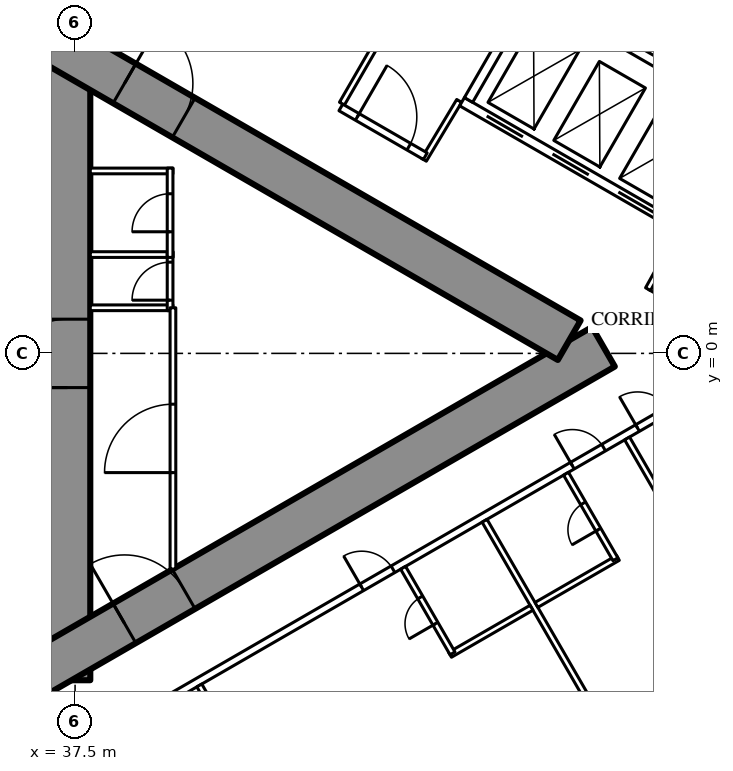
"""IFC4 building model, lengths in metres.
Left out: names, types, materials, properties, quantities, classifications, styles, units other than length and angle.
Written with IfcOpenShell. Run it as: python <this file> out.ifc"""

import sys

from ifc_helpers import new_model, si_unit, direction, frame, frame_2d, origin, place, context, subcontext, project, spatial, rectangle, extrude, element, fill, save


model = new_model("IFC4")
c1 = context("Model", 3, precision=1e-05, world=origin(), true_north=direction((0.0, 1.0)))
c2 = subcontext(c1, "Body", "Model", "MODEL_VIEW")
j1 = project(units=[si_unit("LENGTHUNIT", "METRE"), si_unit("PLANEANGLEUNIT", "RADIAN")], contexts=[c1])
p1 = place(None, origin())
s1 = spatial("IfcSite", under=j1, at=p1, CompositionType="ELEMENT")
p2 = place(p1, origin())
s2 = spatial("IfcBuilding", under=s1, at=p2, CompositionType="ELEMENT")
p3 = place(p2, frame((0.0, 0.0, 173.8)))
s3 = spatial("IfcBuildingStorey", under=s2, at=p3, CompositionType="ELEMENT", Elevation=173.8)
p4 = place(p3, frame((37.3, -8.6, 0.0), z_axis=(0.0, 0.0, 1.0), x_axis=(0.0, 1.0, 0.0)))
e1 = element("IfcWall", 1, at=p4, inside=s3, PredefinedType="SHEAR", context=c2, shape_type="SweptSolid", body=[
    extrude(rectangle(XDim=17.2, YDim=1.2, at=frame_2d((8.6, 0.0))), origin(), (0.0, 0.0, 1.0), 3.5),
])
p5 = place(p4, frame((7.7, 0.0, 0.0)))
e2 = element("IfcOpeningElement", 2, at=p5, cuts=e1, PredefinedType="OPENING", context=c2, shape_type="SweptSolid", body=[
    extrude(rectangle(XDim=1.8, YDim=2.2, at=frame_2d((0.9, 1.1))), frame((0.0, 0.61, 0.0), z_axis=(0.0, -1.0, 0.0), x_axis=(1.0, 0.0, 0.0)), (0.0, 0.0, 1.0), 1.22),
])
p6 = place(p3, frame((27.2, -13.8, 0.0), z_axis=(0.0, 0.0, 1.0), x_axis=(0.866027159892, 0.499996958321, 0.0)))
e3 = element("IfcWall", 3, at=p6, inside=s3, PredefinedType="SHEAR", context=c2, shape_type="SweptSolid", body=[
    extrude(rectangle(XDim=27.947, YDim=1.2, at=frame_2d((13.973, 0.0))), origin(), (0.0, 0.0, 1.0), 3.5),
])
p7 = place(p6, frame((4.6, 0.0, 0.0)))
e4 = element("IfcOpeningElement", 4, at=p7, cuts=e3, PredefinedType="OPENING", context=c2, shape_type="SweptSolid", body=[
    extrude(rectangle(XDim=1.0, YDim=2.2, at=frame_2d((0.5, 1.1))), frame((0.0, 0.61, 0.0), z_axis=(0.0, -1.0, 0.0), x_axis=(1.0, 0.0, 0.0)), (0.0, 0.0, 1.0), 1.22),
])
p8 = place(p6, frame((13.395, 0.0, 0.0)))
e5 = element("IfcOpeningElement", 5, at=p8, cuts=e3, PredefinedType="OPENING", context=c2, shape_type="SweptSolid", body=[
    extrude(rectangle(XDim=1.8, YDim=2.2, at=frame_2d((0.9, 1.1))), frame((0.0, 0.61, 0.0), z_axis=(0.0, -1.0, 0.0), x_axis=(1.0, 0.0, 0.0)), (0.0, 0.0, 1.0), 1.22),
])
p9 = place(p3, frame((27.2, 13.8, 0.0), z_axis=(0.0, 0.0, 1.0), x_axis=(0.866024515034, -0.500001539357, 0.0)))
e6 = element("IfcWall", 6, at=p9, inside=s3, PredefinedType="SHEAR", context=c2, shape_type="SweptSolid", body=[
    extrude(rectangle(XDim=26.907, YDim=1.2, at=frame_2d((13.454, 0.0))), origin(), (0.0, 0.0, 1.0), 3.5),
])
p10 = place(p9, frame((4.6, 0.0, 0.0)))
e7 = element("IfcOpeningElement", 7, at=p10, cuts=e6, PredefinedType="OPENING", context=c2, shape_type="SweptSolid", body=[
    extrude(rectangle(XDim=1.0, YDim=2.2, at=frame_2d((0.5, 1.1))), frame((0.0, 0.61, 0.0), z_axis=(0.0, -1.0, 0.0), x_axis=(1.0, 0.0, 0.0)), (0.0, 0.0, 1.0), 1.22),
])
p11 = place(p9, frame((13.395, 0.0, 0.0)))
e8 = element("IfcOpeningElement", 8, at=p11, cuts=e6, PredefinedType="OPENING", context=c2, shape_type="SweptSolid", body=[
    extrude(rectangle(XDim=1.8, YDim=2.2, at=frame_2d((0.9, 1.1))), frame((0.0, 0.61, 0.0), z_axis=(0.0, -1.0, 0.0), x_axis=(1.0, 0.0, 0.0)), (0.0, 0.0, 1.0), 1.22),
])
p12 = place(p3, frame((27.959, -16.017, 0.0), z_axis=(0.0, 0.0, 1.0), x_axis=(0.866024151371, 0.500002169237, 0.0)))
e9 = element("IfcWall", 9, at=p12, inside=s3, PredefinedType="PARTITIONING", context=c2, shape_type="SweptSolid", body=[
    extrude(rectangle(XDim=32.034, YDim=0.2, at=frame_2d((16.017, 0.0))), origin(), (0.0, 0.0, 1.0), 3.25),
])
p13 = place(p12, frame((4.765, 0.0, 0.0)))
e10 = element("IfcOpeningElement", 10, at=p13, cuts=e9, PredefinedType="OPENING", context=c2, shape_type="SweptSolid", body=[
    extrude(rectangle(XDim=0.95, YDim=2.2, at=frame_2d((0.475, 1.1))), frame((0.0, 0.11, 0.0), z_axis=(0.0, -1.0, 0.0), x_axis=(1.0, 0.0, 0.0)), (0.0, 0.0, 1.0), 0.22),
])
p14 = place(p12, frame((9.215, 0.0, 0.0)))
e11 = element("IfcOpeningElement", 11, at=p14, cuts=e9, PredefinedType="OPENING", context=c2, shape_type="SweptSolid", body=[
    extrude(rectangle(XDim=1.0, YDim=2.2, at=frame_2d((0.5, 1.1))), frame((0.0, 0.11, 0.0), z_axis=(0.0, -1.0, 0.0), x_axis=(1.0, 0.0, 0.0)), (0.0, 0.0, 1.0), 0.22),
])
p15 = place(p12, frame((19.725, 0.0, 0.0)))
e12 = element("IfcOpeningElement", 12, at=p15, cuts=e9, PredefinedType="OPENING", context=c2, shape_type="SweptSolid", body=[
    extrude(rectangle(XDim=0.95, YDim=2.2, at=frame_2d((0.475, 1.1))), frame((0.0, 0.11, 0.0), z_axis=(0.0, -1.0, 0.0), x_axis=(1.0, 0.0, 0.0)), (0.0, 0.0, 1.0), 0.22),
])
p16 = place(p12, frame((26.125, 0.0, 0.0)))
e13 = element("IfcOpeningElement", 13, at=p16, cuts=e9, PredefinedType="OPENING", context=c2, shape_type="SweptSolid", body=[
    extrude(rectangle(XDim=0.95, YDim=2.2, at=frame_2d((0.475, 1.1))), frame((0.0, 0.11, 0.0), z_axis=(0.0, -1.0, 0.0), x_axis=(1.0, 0.0, 0.0)), (0.0, 0.0, 1.0), 0.22),
])
p17 = place(p12, frame((28.106, 0.0, 0.0)))
e14 = element("IfcOpeningElement", 14, at=p17, cuts=e9, PredefinedType="OPENING", context=c2, shape_type="SweptSolid", body=[
    extrude(rectangle(XDim=0.95, YDim=2.2, at=frame_2d((0.475, 1.1))), frame((0.0, 0.11, 0.0), z_axis=(0.0, -1.0, 0.0), x_axis=(1.0, 0.0, 0.0)), (0.0, 0.0, 1.0), 0.22),
])
p18 = place(p3, frame((40.769, -8.737, 0.0), z_axis=(0.0, 0.0, 1.0), x_axis=(0.500013115284, -0.866017831539, 0.0)))
e15 = element("IfcWall", 15, at=p18, inside=s3, PredefinedType="PARTITIONING", context=c2, shape_type="SweptSolid", body=[
    extrude(rectangle(XDim=7.198, YDim=0.15, at=frame_2d((3.599, 0.0))), origin(), (0.0, 0.0, 1.0), 2.3),
])
p19 = place(p3, frame((48.275, -4.404, 0.0), z_axis=(0.0, 0.0, 1.0), x_axis=(0.500006004368, -0.866021937133, 0.0)))
e16 = element("IfcWall", 16, at=p19, inside=s3, PredefinedType="PARTITIONING", context=c2, shape_type="SweptSolid", body=[
    extrude(rectangle(XDim=7.279, YDim=0.15, at=frame_2d((3.64, 0.0))), origin(), (0.0, 0.0, 1.0), 2.3),
])
p20 = place(p3, frame((52.025, -2.238, 0.0), z_axis=(0.0, 0.0, 1.0), x_axis=(0.499983785035, -0.866034765296, 0.0)))
e17 = element("IfcWall", 17, at=p20, inside=s3, PredefinedType="PARTITIONING", context=c2, shape_type="SweptSolid", body=[
    extrude(rectangle(XDim=7.116, YDim=0.15, at=frame_2d((3.558, 0.0))), origin(), (0.0, 0.0, 1.0), 2.3),
])
p21 = place(p3, frame((44.521, 6.571, 0.0), z_axis=(0.0, 0.0, 1.0), x_axis=(0.500020376429, 0.866013639128, 0.0)))
e18 = element("IfcWall", 18, at=p21, inside=s3, PredefinedType="PARTITIONING", context=c2, shape_type="SweptSolid", body=[
    extrude(rectangle(XDim=7.306, YDim=0.15, at=frame_2d((3.653, 0.0))), origin(), (0.0, 0.0, 1.0), 2.3),
])
p22 = place(p3, frame((52.639, 1.769, 0.0), z_axis=(0.0, 0.0, 1.0), x_axis=(0.866027340901, -0.4999966448, 0.0)))
e19 = element("IfcWall", 19, at=p22, inside=s3, PredefinedType="PARTITIONING", context=c2, shape_type="SweptSolid", body=[
    extrude(rectangle(XDim=3.417, YDim=0.2, at=frame_2d((1.708, 0.0))), origin(), (0.0, 0.0, 1.0), 3.25),
])
p23 = place(p22, frame((0.809, 0.0, 0.0)))
e20 = element("IfcOpeningElement", 20, at=p23, cuts=e19, PredefinedType="OPENING", context=c2, shape_type="SweptSolid", body=[
    extrude(rectangle(XDim=1.8, YDim=2.2, at=frame_2d((0.9, 1.1))), frame((0.0, 0.11, 0.0), z_axis=(0.0, -1.0, 0.0), x_axis=(1.0, 0.0, 0.0)), (0.0, 0.0, 1.0), 0.22),
])
p24 = place(p3, frame((52.576, 1.689, 0.0), z_axis=(0.0, 0.0, 1.0), x_axis=(0.485424724123, 0.874278466629, 0.0)))
e21 = element("IfcWall", 21, at=p24, inside=s3, PredefinedType="PARTITIONING", context=c2, shape_type="SweptSolid", body=[
    extrude(rectangle(XDim=1.805, YDim=0.15, at=frame_2d((0.903, 0.0))), origin(), (0.0, 0.0, 1.0), 3.25),
])
p25 = place(p3, frame((47.606, 6.643, 0.0), z_axis=(0.0, 0.0, 1.0), x_axis=(-0.514237157483, -0.857648031458, 0.0)))
e22 = element("IfcWall", 22, at=p25, inside=s3, PredefinedType="PARTITIONING", context=c2, shape_type="SweptSolid", body=[
    extrude(rectangle(XDim=1.805, YDim=0.15, at=frame_2d((0.902, 0.0))), origin(), (0.0, 0.0, 1.0), 3.25),
])
p26 = place(p3, frame((44.493, 6.472, 0.0), z_axis=(0.0, 0.0, 1.0), x_axis=(0.866027140358, -0.499996992154, 0.0)))
e23 = element("IfcWall", 23, at=p26, inside=s3, PredefinedType="PARTITIONING", context=c2, shape_type="SweptSolid", body=[
    extrude(rectangle(XDim=2.566, YDim=0.2, at=frame_2d((1.283, 0.0))), origin(), (0.0, 0.0, 1.0), 3.25),
])
p27 = place(p26, frame((0.5, 0.0, 0.0)))
e24 = element("IfcOpeningElement", 24, at=p27, cuts=e23, PredefinedType="OPENING", context=c2, shape_type="SweptSolid", body=[
    extrude(rectangle(XDim=1.566, YDim=2.2, at=frame_2d((0.783, 1.1))), frame((0.0, 0.11, 0.0), z_axis=(0.0, -1.0, 0.0), x_axis=(1.0, 0.0, 0.0)), (0.0, 0.0, 1.0), 0.22),
])
p28 = place(p3, frame((47.366, -7.93, 0.0), z_axis=(0.0, 0.0, 1.0), x_axis=(0.866031185235, 0.4999899861, 0.0)))
e25 = element("IfcWall", 25, at=p28, inside=s3, PredefinedType="PARTITIONING", context=c2, shape_type="SweptSolid", body=[
    extrude(rectangle(XDim=2.475, YDim=0.15, at=frame_2d((1.238, 0.0))), origin(), (0.0, 0.0, 1.0), 3.25),
])
p29 = place(p3, frame((46.131, -5.641, 0.0), z_axis=(0.0, 0.0, 1.0), x_axis=(0.49997716683, -0.86603858612, 0.0)))
e26 = element("IfcWall", 26, at=p29, inside=s3, PredefinedType="PARTITIONING", context=c2, shape_type="SweptSolid", body=[
    extrude(rectangle(XDim=2.6, YDim=0.15, at=frame_2d((1.3, 0.0))), origin(), (0.0, 0.0, 1.0), 3.25),
])
p30 = place(p29, frame((0.9, 0.0, 0.0)))
e27 = element("IfcOpeningElement", 27, at=p30, cuts=e26, PredefinedType="OPENING", context=c2, shape_type="SweptSolid", body=[
    extrude(rectangle(XDim=0.8, YDim=2.2, at=frame_2d((0.4, 1.1))), frame((0.0, 0.085, 0.0), z_axis=(0.0, -1.0, 0.0), x_axis=(1.0, 0.0, 0.0)), (0.0, 0.0, 1.0), 0.17),
])
p31 = place(p3, frame((49.64, -6.618, 0.0), z_axis=(0.0, 0.0, 1.0), x_axis=(0.866006523861, 0.500032699561, 0.0)))
e28 = element("IfcWall", 28, at=p31, inside=s3, PredefinedType="PARTITIONING", context=c2, shape_type="SweptSolid", body=[
    extrude(rectangle(XDim=2.475, YDim=0.15, at=frame_2d((1.237, 0.0))), origin(), (0.0, 0.0, 1.0), 3.25),
])
p32 = place(p3, frame((50.418, -3.166, 0.0), z_axis=(0.0, 0.0, 1.0), x_axis=(0.499936506574, -0.866062058628, 0.0)))
e29 = element("IfcWall", 29, at=p32, inside=s3, PredefinedType="PARTITIONING", context=c2, shape_type="SweptSolid", body=[
    extrude(rectangle(XDim=2.6, YDim=0.15, at=frame_2d((1.3, 0.0))), origin(), (0.0, 0.0, 1.0), 3.25),
])
p33 = place(p32, frame((0.9, 0.0, 0.0)))
e30 = element("IfcOpeningElement", 30, at=p33, cuts=e29, PredefinedType="OPENING", context=c2, shape_type="SweptSolid", body=[
    extrude(rectangle(XDim=0.8, YDim=2.2, at=frame_2d((0.4, 1.1))), frame((0.0, 0.085, 0.0), z_axis=(0.0, -1.0, 0.0), x_axis=(1.0, 0.0, 0.0)), (0.0, 0.0, 1.0), 0.17),
])
for number, where, z_axis, x_axis in (
    (31, (37.9, 1.2, 0.0), (0.0, 0.0, 1.0), (1.0, 0.0, 0.0)),
    (32, (37.9, 2.6, 0.0), (0.0, 0.0, 1.0), (1.0, 0.0, 0.0)),
    (33, (37.9, 4.8, 0.0), (0.0, 0.0, 1.0), (1.0, 0.0, 0.0)),
):
    element("IfcWall", number, at=place(p3, frame(where, z_axis=z_axis, x_axis=x_axis)), inside=s3, PredefinedType="PARTITIONING", context=c2, shape_type="SweptSolid", body=[
        extrude(rectangle(XDim=2.175, YDim=0.15, at=frame_2d((1.087, 0.0))), origin(), (0.0, 0.0, 1.0), 3.25),
    ])
p34 = place(p3, frame((40.0, 1.125, 0.0), z_axis=(0.0, 0.0, 1.0), x_axis=(0.0, 1.0, 0.0)))
e34 = element("IfcWall", 34, at=p34, inside=s3, PredefinedType="PARTITIONING", context=c2, shape_type="SweptSolid", body=[
    extrude(rectangle(XDim=1.55, YDim=0.15, at=frame_2d((0.775, 0.0))), origin(), (0.0, 0.0, 1.0), 3.25),
])
p35 = place(p34, frame((0.275, 0.0, 0.0)))
e35 = element("IfcOpeningElement", 35, at=p35, cuts=e34, PredefinedType="OPENING", context=c2, shape_type="SweptSolid", body=[
    extrude(rectangle(XDim=1.0, YDim=2.2, at=frame_2d((0.5, 1.1))), frame((0.0, 0.085, 0.0), z_axis=(0.0, -1.0, 0.0), x_axis=(1.0, 0.0, 0.0)), (0.0, 0.0, 1.0), 0.17),
])
p36 = place(p3, frame((40.0, 2.525, 0.0), z_axis=(0.0, 0.0, 1.0), x_axis=(0.0, 1.0, 0.0)))
e36 = element("IfcWall", 36, at=p36, inside=s3, PredefinedType="PARTITIONING", context=c2, shape_type="SweptSolid", body=[
    extrude(rectangle(XDim=2.35, YDim=0.15, at=frame_2d((1.175, 0.0))), origin(), (0.0, 0.0, 1.0), 3.25),
])
p37 = place(p36, frame((0.675, 0.0, 0.0)))
e37 = element("IfcOpeningElement", 37, at=p37, cuts=e36, PredefinedType="OPENING", context=c2, shape_type="SweptSolid", body=[
    extrude(rectangle(XDim=1.0, YDim=2.2, at=frame_2d((0.5, 1.1))), frame((0.0, 0.085, 0.0), z_axis=(0.0, -1.0, 0.0), x_axis=(1.0, 0.0, 0.0)), (0.0, 0.0, 1.0), 0.17),
])
p38 = place(p3, frame((40.075, -5.674, 0.0), z_axis=(0.0, 0.0, 1.0), x_axis=(0.0, 1.0, 0.0)))
e38 = element("IfcWall", 38, at=p38, inside=s3, PredefinedType="PARTITIONING", context=c2, shape_type="SweptSolid", body=[
    extrude(rectangle(XDim=6.874, YDim=0.15, at=frame_2d((3.437, 0.0))), origin(), (0.0, 0.0, 1.0), 3.25),
])
p39 = place(p38, frame((2.537, 0.0, 0.0)))
e39 = element("IfcOpeningElement", 39, at=p39, cuts=e38, PredefinedType="OPENING", context=c2, shape_type="SweptSolid", body=[
    extrude(rectangle(XDim=1.8, YDim=2.2, at=frame_2d((0.9, 1.1))), frame((0.0, 0.085, 0.0), z_axis=(0.0, -1.0, 0.0), x_axis=(1.0, 0.0, 0.0)), (0.0, 0.0, 1.0), 0.17),
])
p40 = place(p3, frame((47.681, 6.622, 0.0), z_axis=(0.0, 0.0, 1.0), x_axis=(0.86603344179, -0.499986077507, 0.0)))
e40 = element("IfcWall", 40, at=p40, inside=s3, PredefinedType="PARTITIONING", context=c2, shape_type="SweptSolid", body=[
    extrude(rectangle(XDim=6.6, YDim=0.25, at=frame_2d((3.3, 0.0))), origin(), (0.0, 0.0, 1.0), 3.25),
])
p41 = place(p40, frame((0.75, 0.0, 0.0)))
e41 = element("IfcOpeningElement", 41, at=p41, cuts=e40, PredefinedType="OPENING", context=c2, shape_type="SweptSolid", body=[
    extrude(rectangle(XDim=1.1, YDim=2.2, at=frame_2d((0.55, 1.1))), frame((0.0, 0.135, 0.0), z_axis=(0.0, -1.0, 0.0), x_axis=(1.0, 0.0, 0.0)), (0.0, 0.0, 1.0), 0.27),
])
p42 = place(p40, frame((2.75, 0.0, 0.0)))
e42 = element("IfcOpeningElement", 42, at=p42, cuts=e40, PredefinedType="OPENING", context=c2, shape_type="SweptSolid", body=[
    extrude(rectangle(XDim=1.1, YDim=2.2, at=frame_2d((0.55, 1.1))), frame((0.0, 0.135, 0.0), z_axis=(0.0, -1.0, 0.0), x_axis=(1.0, 0.0, 0.0)), (0.0, 0.0, 1.0), 0.27),
])
p43 = place(p40, frame((4.75, 0.0, 0.0)))
e43 = element("IfcOpeningElement", 43, at=p43, cuts=e40, PredefinedType="OPENING", context=c2, shape_type="SweptSolid", body=[
    extrude(rectangle(XDim=1.1, YDim=2.2, at=frame_2d((0.55, 1.1))), frame((0.0, 0.135, 0.0), z_axis=(0.0, -1.0, 0.0), x_axis=(1.0, 0.0, 0.0)), (0.0, 0.0, 1.0), 0.27),
])
p44 = place(p3, frame((49.406, 9.611, 0.0), z_axis=(0.0, 0.0, 1.0), x_axis=(0.86603344179, -0.499986077507, 0.0)))
e44 = element("IfcWall", 44, at=p44, inside=s3, PredefinedType="PARTITIONING", context=c2, shape_type="SweptSolid", body=[
    extrude(rectangle(XDim=6.6, YDim=0.25, at=frame_2d((3.3, 0.0))), origin(), (0.0, 0.0, 1.0), 3.25),
])
p45 = place(p3, frame((47.852, 6.668, 0.0), z_axis=(0.0, 0.0, 1.0), x_axis=(0.499929347863, 0.866066190972, 0.0)))
e45 = element("IfcWall", 45, at=p45, inside=s3, PredefinedType="PARTITIONING", context=c2, shape_type="SweptSolid", body=[
    extrude(rectangle(XDim=3.201, YDim=0.25, at=frame_2d((1.6, 0.0))), origin(), (0.0, 0.0, 1.0), 3.25),
])
p46 = place(p30, origin())
e46 = element("IfcDoor", 46, at=p46, inside=s3, OperationType="SINGLE_SWING_RIGHT", PredefinedType="DOOR", context=c2, shape_type="SweptSolid", body=[
    extrude(rectangle(XDim=0.8, YDim=2.2, at=frame_2d((0.4, 1.1))), frame((0.0, 0.025, 0.0), z_axis=(0.0, -1.0, 0.0), x_axis=(1.0, 0.0, 0.0)), (0.0, 0.0, 1.0), 0.05),
])
fill(e27, e46)
p47 = place(p15, origin())
e47 = element("IfcDoor", 47, at=p47, inside=s3, OperationType="SINGLE_SWING_LEFT", PredefinedType="DOOR", context=c2, shape_type="SweptSolid", body=[
    extrude(rectangle(XDim=0.95, YDim=2.2, at=frame_2d((0.475, 1.1))), frame((0.0, 0.025, 0.0), z_axis=(0.0, -1.0, 0.0), x_axis=(1.0, 0.0, 0.0)), (0.0, 0.0, 1.0), 0.05),
])
fill(e12, e47)
p48 = place(p33, origin())
e48 = element("IfcDoor", 48, at=p48, inside=s3, OperationType="SINGLE_SWING_RIGHT", PredefinedType="DOOR", context=c2, shape_type="SweptSolid", body=[
    extrude(rectangle(XDim=0.8, YDim=2.2, at=frame_2d((0.4, 1.1))), frame((0.0, 0.025, 0.0), z_axis=(0.0, -1.0, 0.0), x_axis=(1.0, 0.0, 0.0)), (0.0, 0.0, 1.0), 0.05),
])
fill(e30, e48)
p49 = place(p16, origin())
e49 = element("IfcDoor", 49, at=p49, inside=s3, OperationType="SINGLE_SWING_LEFT", PredefinedType="DOOR", context=c2, shape_type="SweptSolid", body=[
    extrude(rectangle(XDim=0.95, YDim=2.2, at=frame_2d((0.475, 1.1))), frame((0.0, 0.025, 0.0), z_axis=(0.0, -1.0, 0.0), x_axis=(1.0, 0.0, 0.0)), (0.0, 0.0, 1.0), 0.05),
])
fill(e13, e49)
p50 = place(p17, origin())
e50 = element("IfcDoor", 50, at=p50, inside=s3, OperationType="SINGLE_SWING_LEFT", PredefinedType="DOOR", context=c2, shape_type="SweptSolid", body=[
    extrude(rectangle(XDim=0.95, YDim=2.2, at=frame_2d((0.475, 1.1))), frame((0.0, 0.025, 0.0), z_axis=(0.0, -1.0, 0.0), x_axis=(1.0, 0.0, 0.0)), (0.0, 0.0, 1.0), 0.05),
])
fill(e14, e50)
p51 = place(p27, origin())
e51 = element("IfcDoor", 51, at=p51, inside=s3, OperationType="SINGLE_SWING_LEFT", PredefinedType="DOOR", context=c2, shape_type="SweptSolid", body=[
    extrude(rectangle(XDim=1.566, YDim=2.2, at=frame_2d((0.783, 1.1))), frame((0.0, 0.025, 0.0), z_axis=(0.0, -1.0, 0.0), x_axis=(1.0, 0.0, 0.0)), (0.0, 0.0, 1.0), 0.05),
])
fill(e24, e51)
p52 = place(p35, origin())
e52 = element("IfcDoor", 52, at=p52, inside=s3, OperationType="SINGLE_SWING_LEFT", PredefinedType="DOOR", context=c2, shape_type="SweptSolid", body=[
    extrude(rectangle(XDim=1.0, YDim=2.2, at=frame_2d((0.5, 1.1))), frame((0.0, 0.025, 0.0), z_axis=(0.0, -1.0, 0.0), x_axis=(1.0, 0.0, 0.0)), (0.0, 0.0, 1.0), 0.05),
])
fill(e35, e52)
p53 = place(p37, origin())
e53 = element("IfcDoor", 53, at=p53, inside=s3, OperationType="SINGLE_SWING_LEFT", PredefinedType="DOOR", context=c2, shape_type="SweptSolid", body=[
    extrude(rectangle(XDim=1.0, YDim=2.2, at=frame_2d((0.5, 1.1))), frame((0.0, 0.025, 0.0), z_axis=(0.0, -1.0, 0.0), x_axis=(1.0, 0.0, 0.0)), (0.0, 0.0, 1.0), 0.05),
])
fill(e37, e53)
p54 = place(p39, origin())
e54 = element("IfcDoor", 54, at=p54, inside=s3, OperationType="DOUBLE_DOOR_SINGLE_SWING", PredefinedType="DOOR", context=c2, shape_type="SweptSolid", body=[
    extrude(rectangle(XDim=1.8, YDim=2.2, at=frame_2d((0.9, 1.1))), frame((0.0, 0.025, 0.0), z_axis=(0.0, -1.0, 0.0), x_axis=(1.0, 0.0, 0.0)), (0.0, 0.0, 1.0), 0.05),
])
fill(e39, e54)
p55 = place(p8, origin())
e55 = element("IfcDoor", 55, at=p55, inside=s3, OperationType="DOUBLE_DOOR_SINGLE_SWING", PredefinedType="DOOR", context=c2, shape_type="SweptSolid", body=[
    extrude(rectangle(XDim=1.8, YDim=2.2, at=frame_2d((0.9, 1.1))), frame((0.0, 0.025, 0.0), z_axis=(0.0, -1.0, 0.0), x_axis=(1.0, 0.0, 0.0)), (0.0, 0.0, 1.0), 0.05),
])
fill(e5, e55)
p56 = place(p11, origin())
e56 = element("IfcDoor", 56, at=p56, inside=s3, OperationType="DOUBLE_DOOR_SINGLE_SWING", PredefinedType="DOOR", context=c2, shape_type="SweptSolid", body=[
    extrude(rectangle(XDim=1.8, YDim=2.2, at=frame_2d((0.9, 1.1))), frame((0.0, 0.025, 0.0), z_axis=(0.0, -1.0, 0.0), x_axis=(1.0, 0.0, 0.0)), (0.0, 0.0, 1.0), 0.05),
])
fill(e8, e56)
p57 = place(p5, origin())
e57 = element("IfcDoor", 57, at=p57, inside=s3, OperationType="DOUBLE_DOOR_SINGLE_SWING", PredefinedType="DOOR", context=c2, shape_type="SweptSolid", body=[
    extrude(rectangle(XDim=1.8, YDim=2.2, at=frame_2d((0.9, 1.1))), frame((0.0, 0.025, 0.0), z_axis=(0.0, -1.0, 0.0), x_axis=(1.0, 0.0, 0.0)), (0.0, 0.0, 1.0), 0.05),
])
fill(e2, e57)
p58 = place(p41, origin())
e58 = element("IfcDoor", 58, at=p58, inside=s3, OperationType="DOUBLE_DOOR_SLIDING", PredefinedType="USERDEFINED", context=c2, shape_type="SweptSolid", body=[
    extrude(rectangle(XDim=1.1, YDim=2.2, at=frame_2d((0.55, 1.1))), frame((0.0, 0.025, 0.0), z_axis=(0.0, -1.0, 0.0), x_axis=(1.0, 0.0, 0.0)), (0.0, 0.0, 1.0), 0.05),
])
fill(e41, e58)
p59 = place(p42, origin())
e59 = element("IfcDoor", 59, at=p59, inside=s3, OperationType="DOUBLE_DOOR_SLIDING", PredefinedType="USERDEFINED", context=c2, shape_type="SweptSolid", body=[
    extrude(rectangle(XDim=1.1, YDim=2.2, at=frame_2d((0.55, 1.1))), frame((0.0, 0.025, 0.0), z_axis=(0.0, -1.0, 0.0), x_axis=(1.0, 0.0, 0.0)), (0.0, 0.0, 1.0), 0.05),
])
fill(e42, e59)
p60 = place(p43, origin())
e60 = element("IfcDoor", 60, at=p60, inside=s3, OperationType="DOUBLE_DOOR_SLIDING", PredefinedType="USERDEFINED", context=c2, shape_type="SweptSolid", body=[
    extrude(rectangle(XDim=1.1, YDim=2.2, at=frame_2d((0.55, 1.1))), frame((0.0, 0.025, 0.0), z_axis=(0.0, -1.0, 0.0), x_axis=(1.0, 0.0, 0.0)), (0.0, 0.0, 1.0), 0.05),
])
fill(e43, e60)
save(model, sys.argv[1])
